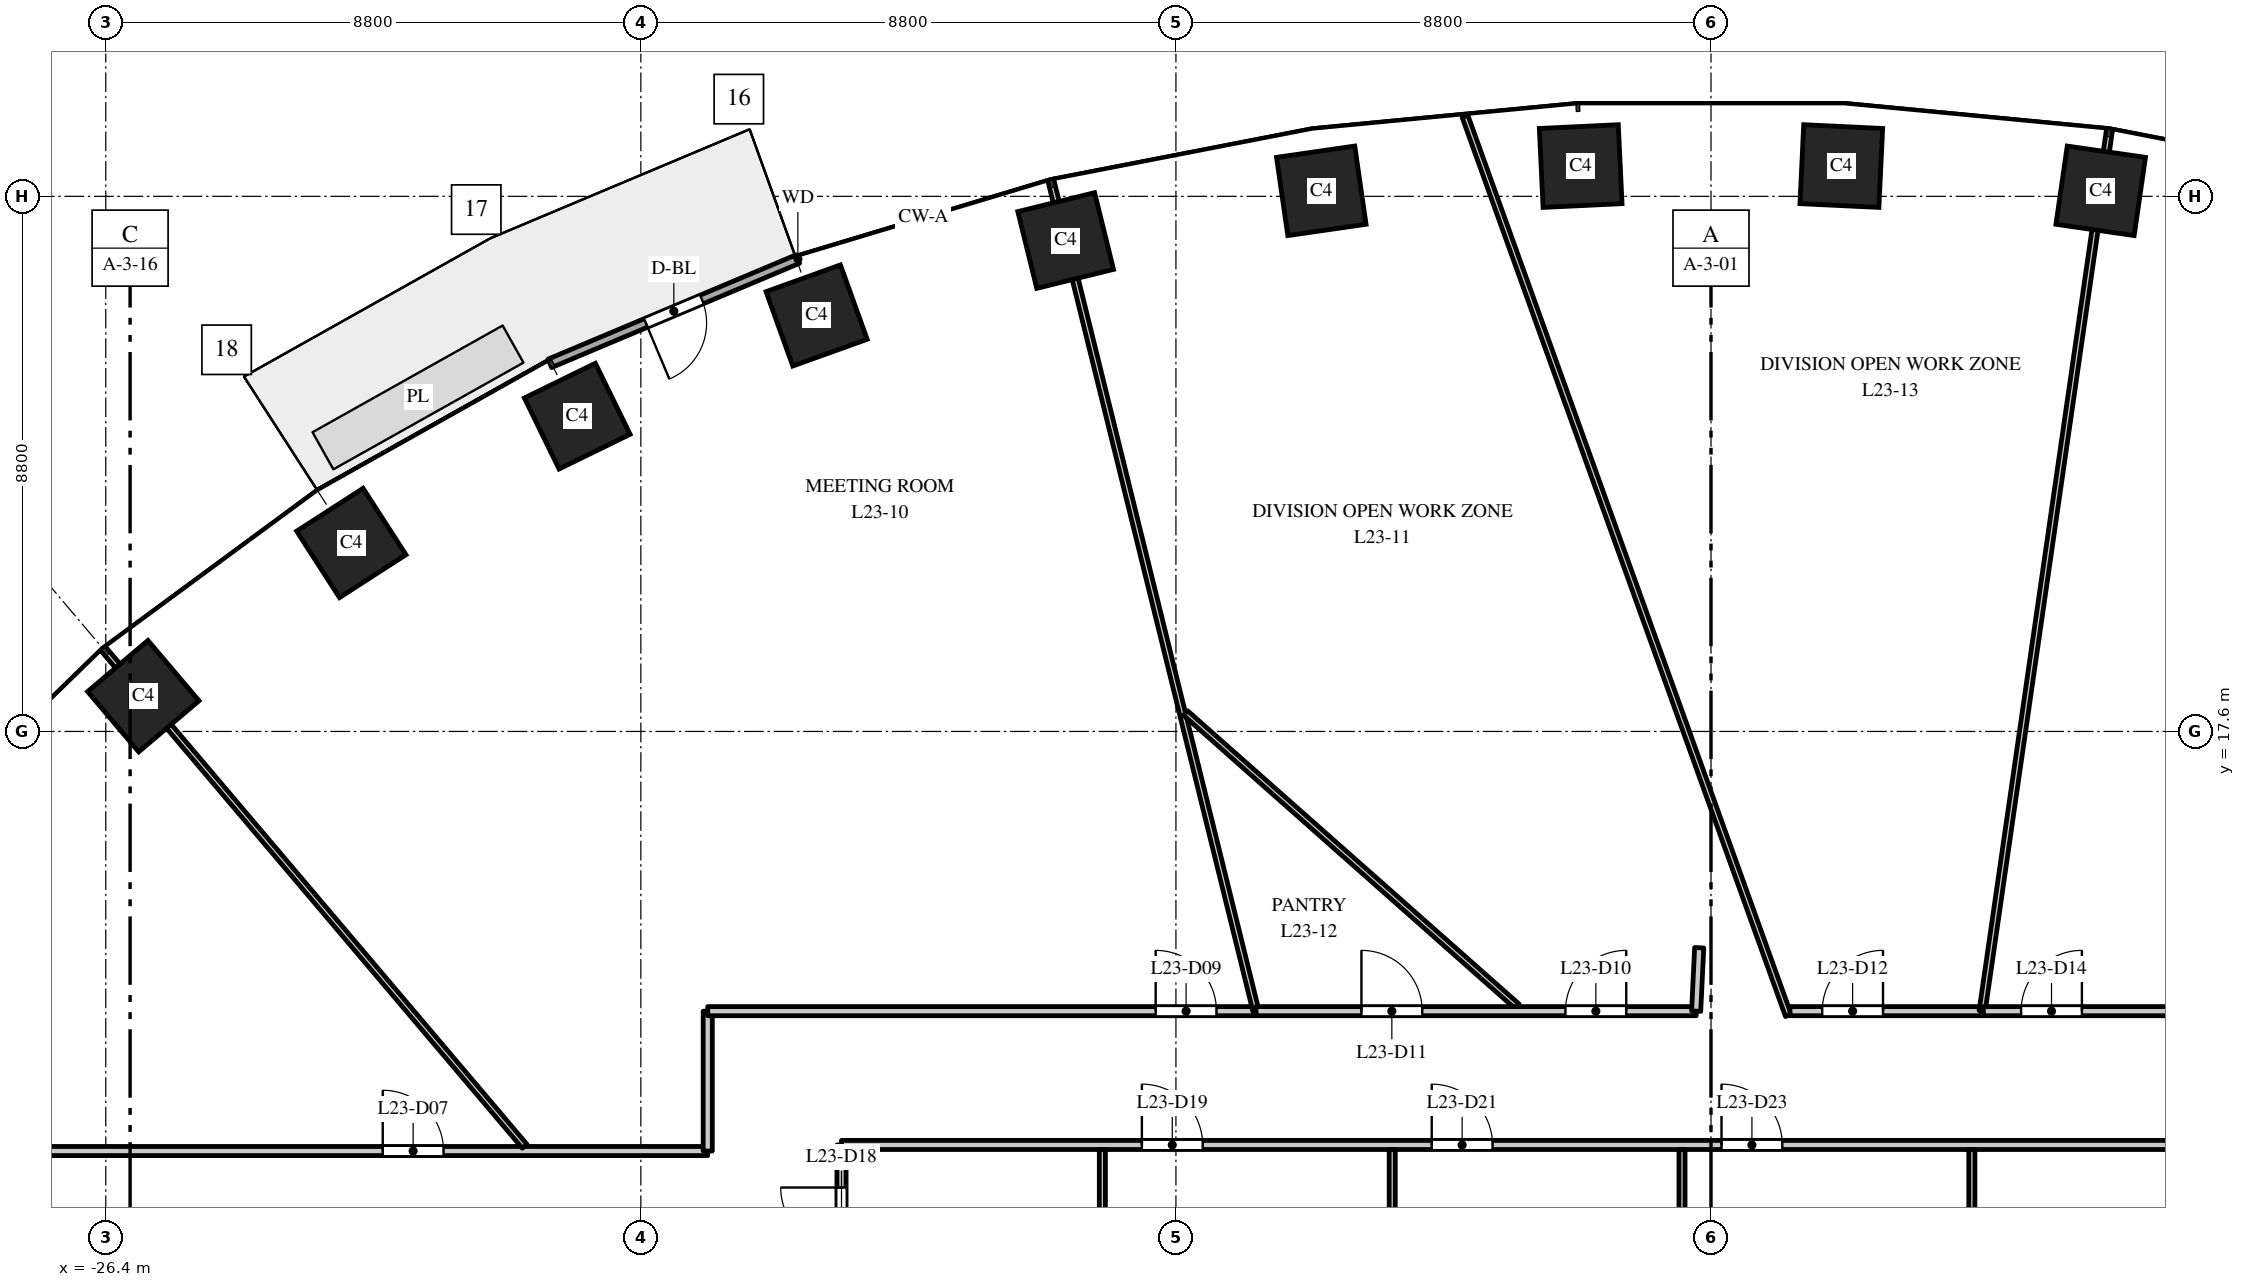
"""IFC4 building model, lengths in metres.
Left out: names, types, materials, properties, quantities, classifications, styles, units other than length and angle.
Written with IfcOpenShell. Run it as: python <this file> out.ifc"""

import sys

from ifc_helpers import new_model, si_unit, direction, frame, frame_2d, origin, origin_2d, place, context, subcontext, project, spatial, rectangle, extrude, element, fill, save


model = new_model("IFC4")
c1 = context("Model", 3, precision=1e-05, world=origin(), true_north=direction((0.0, 1.0)))
c2 = subcontext(c1, "Body", "Model", "MODEL_VIEW")
j1 = project(units=[si_unit("LENGTHUNIT", "METRE"), si_unit("PLANEANGLEUNIT", "RADIAN")], contexts=[c1])
p1 = place(None, origin())
s1 = spatial("IfcSite", under=j1, at=p1, CompositionType="ELEMENT")
p2 = place(p1, origin())
s2 = spatial("IfcBuilding", under=s1, at=p2, CompositionType="ELEMENT")
p3 = place(p2, frame((0.0, 0.0, 104.0)))
s3 = spatial("IfcBuildingStorey", under=s2, at=p3, CompositionType="ELEMENT", Elevation=104.0)
for number, where, z_axis, x_axis in (
    (1, (6.409, 26.491, 0.0), (0.0, 0.0, 1.0), (-0.99, 0.143, 0.0)),
    (2, (2.143, 26.898, 0.0), (0.0, 0.0, 1.0), (-0.999, 0.048, 0.0)),
    (3, (-2.143, 26.898, 0.0), (0.0, 0.0, 1.0), (-0.999, -0.048, 0.0)),
    (4, (-6.409, 26.491, 0.0), (0.0, 0.0, 1.0), (-0.99, -0.143, 0.0)),
    (5, (-10.613, 25.674, 0.0), (0.0, 0.0, 1.0), (-0.971, -0.24, 0.0)),
    (6, (-14.709, 24.441, 0.0), (0.0, 0.0, 1.0), (-0.941, -0.338, 0.0)),
    (7, (-18.646, 22.785, 0.0), (0.0, 0.0, 1.0), (-0.898, -0.439, 0.0)),
    (8, (-22.362, 20.7, 0.0), (0.0, 0.0, 1.0), (-0.84, -0.542, 0.0)),
    (9, (-25.783, 18.18, 0.0), (0.0, 0.0, 1.0), (-0.763, -0.646, 0.0)),
):
    element("IfcColumn", number, at=place(p3, frame(where, z_axis=z_axis, x_axis=x_axis)), inside=s3, PredefinedType="COLUMN", context=c2, shape_type="SweptSolid", body=[
        extrude(rectangle(XDim=1.3, YDim=1.3, at=origin_2d()), origin(), (0.0, 0.0, 1.0), 4.0),
    ])
p4 = place(p3, frame((-15.018, 25.369, 0.0), z_axis=(0.0, 0.0, 1.0), x_axis=(-0.921816985161, -0.387625393736, 0.0)))
e10 = element("IfcWall", 10, at=p4, inside=s3, PredefinedType="STANDARD", context=c2, shape_type="SweptSolid", body=[
    extrude(rectangle(XDim=4.426, YDim=0.15, at=frame_2d((2.213, 0.0))), origin(), (0.0, 0.0, 1.0), 3.7),
])
p5 = place(p4, frame((1.713, 0.0, 0.0)))
e11 = element("IfcOpeningElement", 11, at=p5, cuts=e10, PredefinedType="OPENING", context=c2, shape_type="SweptSolid", body=[
    extrude(rectangle(XDim=1.0, YDim=2.4, at=frame_2d((0.5, 1.2))), frame((0.0, 0.085, 0.0), z_axis=(0.0, -1.0, 0.0), x_axis=(1.0, 0.0, 0.0)), (0.0, 0.0, 1.0), 0.17),
])
p6 = place(p3, frame((-31.5, 10.7, 0.0), z_axis=(0.0, 0.0, 1.0), x_axis=(1.0, 0.0, 0.0)))
e12 = element("IfcWall", 12, at=p6, inside=s3, PredefinedType="PARTITIONING", context=c2, shape_type="SweptSolid", body=[
    extrude(rectangle(XDim=15.0, YDim=0.15, at=frame_2d((7.5, 0.0))), origin(), (0.0, 0.0, 1.0), 3.1),
])
p7 = place(p6, frame((9.655, 0.0, 0.0)))
e13 = element("IfcOpeningElement", 13, at=p7, cuts=e12, PredefinedType="OPENING", context=c2, shape_type="SweptSolid", body=[
    extrude(rectangle(XDim=1.0, YDim=2.1, at=frame_2d((0.5, 1.05))), frame((0.0, 0.085, 0.0), z_axis=(0.0, -1.0, 0.0), x_axis=(1.0, 0.0, 0.0)), (0.0, 0.0, 1.0), 0.17),
])
p8 = place(p3, frame((-26.43, 18.945, 0.0), z_axis=(0.0, 0.0, 1.0), x_axis=(0.646400187952, -0.762998556365, 0.0)))
e14 = element("IfcWall", 14, at=p8, inside=s3, PredefinedType="PARTITIONING", context=c2, shape_type="SweptSolid", body=[
    extrude(rectangle(XDim=10.704, YDim=0.1, at=frame_2d((5.352, 0.0))), origin(), (0.0, 0.0, 1.0), 3.7),
])
p9 = place(p3, frame((-16.5, 10.7, 0.0), z_axis=(0.0, 0.0, 1.0), x_axis=(0.0, 1.0, 0.0)))
e15 = element("IfcWall", 15, at=p9, inside=s3, PredefinedType="PARTITIONING", context=c2, shape_type="SweptSolid", body=[
    extrude(rectangle(XDim=2.3, YDim=0.15, at=frame_2d((1.15, 0.0))), origin(), (0.0, 0.0, 1.0), 2.75),
])
p10 = place(p3, frame((-16.5, 13.0, 0.0), z_axis=(0.0, 0.0, 1.0), x_axis=(1.0, 0.0, 0.0)))
e16 = element("IfcWall", 16, at=p10, inside=s3, PredefinedType="PARTITIONING", context=c2, shape_type="SweptSolid", body=[
    extrude(rectangle(XDim=9.001, YDim=0.15, at=frame_2d((4.5, 0.0))), origin(), (0.0, 0.0, 1.0), 2.85),
])
p11 = place(p10, frame((7.367, 0.0, 0.0)))
e17 = element("IfcOpeningElement", 17, at=p11, cuts=e16, PredefinedType="OPENING", context=c2, shape_type="SweptSolid", body=[
    extrude(rectangle(XDim=1.0, YDim=2.1, at=frame_2d((0.5, 1.05))), frame((0.0, 0.085, 0.0), z_axis=(0.0, -1.0, 0.0), x_axis=(1.0, 0.0, 0.0)), (0.0, 0.0, 1.0), 0.17),
])
p12 = place(p3, frame((-14.3, -10.8, 0.0), z_axis=(0.0, 0.0, 1.0), x_axis=(0.0, 1.0, 0.0)))
e18 = element("IfcWall", 18, at=p12, inside=s3, PredefinedType="PARTITIONING", context=c2, shape_type="SweptSolid", body=[
    extrude(rectangle(XDim=21.6, YDim=0.15, at=frame_2d((10.8, 0.0))), origin(), (0.0, 0.0, 1.0), 2.75),
])
p13 = place(p12, frame((19.9, 0.0, 0.0)))
e19 = element("IfcOpeningElement", 19, at=p13, cuts=e18, PredefinedType="OPENING", context=c2, shape_type="SweptSolid", body=[
    extrude(rectangle(XDim=1.0, YDim=2.1, at=frame_2d((0.5, 1.05))), frame((0.0, 0.085, 0.0), z_axis=(0.0, -1.0, 0.0), x_axis=(1.0, 0.0, 0.0)), (0.0, 0.0, 1.0), 0.17),
])
p14 = place(p3, frame((-14.3, 10.8, 0.0), z_axis=(0.0, 0.0, 1.0), x_axis=(1.0, 0.0, 0.0)))
e20 = element("IfcWall", 20, at=p14, inside=s3, PredefinedType="PARTITIONING", context=c2, shape_type="SweptSolid", body=[
    extrude(rectangle(XDim=28.6, YDim=0.15, at=frame_2d((14.3, 0.0))), origin(), (0.0, 0.0, 1.0), 2.85),
])
p15 = place(p14, frame((4.94, 0.0, 0.0)))
e21 = element("IfcOpeningElement", 21, at=p15, cuts=e20, PredefinedType="OPENING", context=c2, shape_type="SweptSolid", body=[
    extrude(rectangle(XDim=1.0, YDim=2.1, at=frame_2d((0.5, 1.05))), frame((0.0, 0.085, 0.0), z_axis=(0.0, -1.0, 0.0), x_axis=(1.0, 0.0, 0.0)), (0.0, 0.0, 1.0), 0.17),
])
p16 = place(p14, frame((9.707, 0.0, 0.0)))
e22 = element("IfcOpeningElement", 22, at=p16, cuts=e20, PredefinedType="OPENING", context=c2, shape_type="SweptSolid", body=[
    extrude(rectangle(XDim=1.0, YDim=2.1, at=frame_2d((0.5, 1.05))), frame((0.0, 0.085, 0.0), z_axis=(0.0, -1.0, 0.0), x_axis=(1.0, 0.0, 0.0)), (0.0, 0.0, 1.0), 0.17),
])
p17 = place(p14, frame((14.473, 0.0, 0.0)))
e23 = element("IfcOpeningElement", 23, at=p17, cuts=e20, PredefinedType="OPENING", context=c2, shape_type="SweptSolid", body=[
    extrude(rectangle(XDim=1.0, YDim=2.1, at=frame_2d((0.5, 1.05))), frame((0.0, 0.085, 0.0), z_axis=(0.0, -1.0, 0.0), x_axis=(1.0, 0.0, 0.0)), (0.0, 0.0, 1.0), 0.17),
])
p18 = place(p3, frame((-10.853, 26.646, 0.0), z_axis=(0.0, 0.0, 1.0), x_axis=(0.239763745499, -0.97083126564, 0.0)))
e24 = element("IfcWall", 24, at=p18, inside=s3, PredefinedType="PARTITIONING", context=c2, shape_type="SweptSolid", body=[
    extrude(rectangle(XDim=14.056, YDim=0.1, at=frame_2d((7.028, 0.0))), origin(), (0.0, 0.0, 1.0), 2.85),
])
p19 = place(p3, frame((-10.01, -10.725, 0.0), z_axis=(0.0, 0.0, 1.0), x_axis=(0.0, 1.0, 0.0)))
e25 = element("IfcWall", 25, at=p19, inside=s3, PredefinedType="PARTITIONING", context=c2, shape_type="SweptSolid", body=[
    extrude(rectangle(XDim=21.45, YDim=0.1, at=frame_2d((10.725, 0.0))), origin(), (0.0, 0.0, 1.0), 2.75),
])
p20 = place(p3, frame((-8.642, 17.903, 0.0), z_axis=(0.0, 0.0, 1.0), x_axis=(0.749027274438, -0.662539162728, 0.0)))
e26 = element("IfcWall", 26, at=p20, inside=s3, PredefinedType="PARTITIONING", context=c2, shape_type="SweptSolid", body=[
    extrude(rectangle(XDim=7.283, YDim=0.1, at=frame_2d((3.642, 0.0))), origin(), (0.0, 0.0, 1.0), 2.85),
])
p21 = place(p3, frame((-7.483, 13.0, 0.0), z_axis=(0.0, 0.0, 1.0), x_axis=(1.0, 0.0, 0.0)))
e27 = element("IfcWall", 27, at=p21, inside=s3, PredefinedType="PARTITIONING", context=c2, shape_type="SweptSolid", body=[
    extrude(rectangle(XDim=7.239, YDim=0.15, at=frame_2d((3.62, 0.0))), origin(), (0.0, 0.0, 1.0), 2.85),
])
p22 = place(p21, frame((5.089, 0.0, 0.0)))
e28 = element("IfcOpeningElement", 28, at=p22, cuts=e27, PredefinedType="OPENING", context=c2, shape_type="SweptSolid", body=[
    extrude(rectangle(XDim=1.0, YDim=2.1, at=frame_2d((0.5, 1.05))), frame((0.0, 0.085, 0.0), z_axis=(0.0, -1.0, 0.0), x_axis=(1.0, 0.0, 0.0)), (0.0, 0.0, 1.0), 0.17),
])
p23 = place(p21, frame((1.734, 0.0, 0.0)))
e29 = element("IfcOpeningElement", 29, at=p23, cuts=e27, PredefinedType="OPENING", context=c2, shape_type="SweptSolid", body=[
    extrude(rectangle(XDim=1.0, YDim=2.1, at=frame_2d((0.5, 1.05))), frame((0.0, 0.085, 0.0), z_axis=(0.0, -1.0, 0.0), x_axis=(1.0, 0.0, 0.0)), (0.0, 0.0, 1.0), 0.17),
])
p24 = place(p3, frame((-5.243, 6.059, 0.0), z_axis=(0.0, 0.0, 1.0), x_axis=(0.0, 1.0, 0.0)))
e30 = element("IfcWall", 30, at=p24, inside=s3, PredefinedType="PARTITIONING", context=c2, shape_type="SweptSolid", body=[
    extrude(rectangle(XDim=4.666, YDim=0.1, at=frame_2d((2.333, 0.0))), origin(), (0.0, 0.0, 1.0), 2.9),
])
p25 = place(p3, frame((-4.046, 27.717, 0.0), z_axis=(0.0, 0.0, 1.0), x_axis=(0.338390477133, -0.941005783715, 0.0)))
e31 = element("IfcWall", 31, at=p25, inside=s3, PredefinedType="PARTITIONING", context=c2, shape_type="SweptSolid", body=[
    extrude(rectangle(XDim=15.715, YDim=0.1, at=frame_2d((7.857, 0.0))), origin(), (0.0, 0.0, 1.0), 2.85),
])
p26 = place(p3, frame((-0.477, 7.468, 0.0), z_axis=(0.0, 0.0, 1.0), x_axis=(0.0, 1.0, 0.0)))
e32 = element("IfcWall", 32, at=p26, inside=s3, PredefinedType="PARTITIONING", context=c2, shape_type="SweptSolid", body=[
    extrude(rectangle(XDim=3.257, YDim=0.1, at=frame_2d((1.628, 0.0))), origin(), (0.0, 0.0, 1.0), 2.9),
])
p27 = place(p3, frame((-0.244, 13.0, 0.0), z_axis=(0.0, 0.0, 1.0), x_axis=(0.047698455829, 0.998861780884, 0.0)))
e33 = element("IfcWall", 33, at=p27, inside=s3, PredefinedType="PARTITIONING", context=c2, shape_type="SweptSolid", body=[
    extrude(rectangle(XDim=1.044, YDim=0.15, at=frame_2d((0.522, 0.0))), origin(), (0.0, 0.0, 1.0), 3.7),
])
p28 = place(p3, frame((1.299, 13.0, 0.0), z_axis=(0.0, 0.0, 1.0), x_axis=(1.0, 0.0, 0.0)))
e34 = element("IfcWall", 34, at=p28, inside=s3, PredefinedType="PARTITIONING", context=c2, shape_type="SweptSolid", body=[
    extrude(rectangle(XDim=3.16, YDim=0.15, at=frame_2d((1.58, 0.0))), origin(), (0.0, 0.0, 1.0), 2.85),
])
p29 = place(p28, frame((0.53, 0.0, 0.0)))
e35 = element("IfcOpeningElement", 35, at=p29, cuts=e34, PredefinedType="OPENING", context=c2, shape_type="SweptSolid", body=[
    extrude(rectangle(XDim=1.0, YDim=2.1, at=frame_2d((0.5, 1.05))), frame((0.0, 0.085, 0.0), z_axis=(0.0, -1.0, 0.0), x_axis=(1.0, 0.0, 0.0)), (0.0, 0.0, 1.0), 0.17),
])
p30 = place(p3, frame((4.29, 6.568, 0.0), z_axis=(0.0, 0.0, 1.0), x_axis=(0.0, 1.0, 0.0)))
e36 = element("IfcWall", 36, at=p30, inside=s3, PredefinedType="PARTITIONING", context=c2, shape_type="SweptSolid", body=[
    extrude(rectangle(XDim=4.157, YDim=0.1, at=frame_2d((2.079, 0.0))), origin(), (0.0, 0.0, 1.0), 2.9),
])
p31 = place(p3, frame((4.459, 13.004, 0.0), z_axis=(0.0, 0.0, 1.0), x_axis=(0.143087196312, 0.98971008596, 0.0)))
e37 = element("IfcWall", 37, at=p31, inside=s3, PredefinedType="PARTITIONING", context=c2, shape_type="SweptSolid", body=[
    extrude(rectangle(XDim=14.628, YDim=0.1, at=frame_2d((7.314, 0.0))), origin(), (0.0, 0.0, 1.0), 2.85),
])
p32 = place(p3, frame((4.479, 13.0, 0.0), z_axis=(0.0, 0.0, 1.0), x_axis=(1.0, 0.0, 0.0)))
e38 = element("IfcWall", 38, at=p32, inside=s3, PredefinedType="PARTITIONING", context=c2, shape_type="SweptSolid", body=[
    extrude(rectangle(XDim=12.021, YDim=0.15, at=frame_2d((6.01, 0.0))), origin(), (0.0, 0.0, 1.0), 2.85),
])
p33 = place(p32, frame((0.621, 0.0, 0.0)))
e39 = element("IfcOpeningElement", 39, at=p33, cuts=e38, PredefinedType="OPENING", context=c2, shape_type="SweptSolid", body=[
    extrude(rectangle(XDim=1.0, YDim=2.1, at=frame_2d((0.5, 1.05))), frame((0.0, 0.085, 0.0), z_axis=(0.0, -1.0, 0.0), x_axis=(1.0, 0.0, 0.0)), (0.0, 0.0, 1.0), 0.17),
])
p34 = place(p5, origin())
e40 = element("IfcDoor", 40, at=p34, inside=s3, OperationType="SINGLE_SWING_RIGHT", PredefinedType="DOOR", context=c2, shape_type="SweptSolid", body=[
    extrude(rectangle(XDim=1.0, YDim=2.4, at=frame_2d((0.5, 1.2))), frame((0.0, 0.025, 0.0), z_axis=(0.0, -1.0, 0.0), x_axis=(1.0, 0.0, 0.0)), (0.0, 0.0, 1.0), 0.05),
])
fill(e11, e40)
p35 = place(p7, origin())
e41 = element("IfcDoor", 41, at=p35, inside=s3, OperationType="SINGLE_SWING_LEFT", PredefinedType="DOOR", context=c2, shape_type="SweptSolid", body=[
    extrude(rectangle(XDim=1.0, YDim=2.1, at=frame_2d((0.5, 1.05))), frame((0.0, 0.025, 0.0), z_axis=(0.0, -1.0, 0.0), x_axis=(1.0, 0.0, 0.0)), (0.0, 0.0, 1.0), 0.05),
])
fill(e13, e41)
p36 = place(p11, origin())
e42 = element("IfcDoor", 42, at=p36, inside=s3, OperationType="SINGLE_SWING_LEFT", PredefinedType="DOOR", context=c2, shape_type="SweptSolid", body=[
    extrude(rectangle(XDim=1.0, YDim=2.1, at=frame_2d((0.5, 1.05))), frame((0.0, 0.025, 0.0), z_axis=(0.0, -1.0, 0.0), x_axis=(1.0, 0.0, 0.0)), (0.0, 0.0, 1.0), 0.05),
])
fill(e17, e42)
p37 = place(p22, origin())
e43 = element("IfcDoor", 43, at=p37, inside=s3, OperationType="SINGLE_SWING_RIGHT", PredefinedType="DOOR", context=c2, shape_type="SweptSolid", body=[
    extrude(rectangle(XDim=1.0, YDim=2.1, at=frame_2d((0.5, 1.05))), frame((0.0, 0.025, 0.0), z_axis=(0.0, -1.0, 0.0), x_axis=(1.0, 0.0, 0.0)), (0.0, 0.0, 1.0), 0.05),
])
fill(e28, e43)
p38 = place(p23, origin())
e44 = element("IfcDoor", 44, at=p38, inside=s3, OperationType="SINGLE_SWING_LEFT", PredefinedType="DOOR", context=c2, shape_type="SweptSolid", body=[
    extrude(rectangle(XDim=1.0, YDim=2.1, at=frame_2d((0.5, 1.05))), frame((0.0, 0.025, 0.0), z_axis=(0.0, -1.0, 0.0), x_axis=(1.0, 0.0, 0.0)), (0.0, 0.0, 1.0), 0.05),
])
fill(e29, e44)
p39 = place(p29, origin())
e45 = element("IfcDoor", 45, at=p39, inside=s3, OperationType="SINGLE_SWING_RIGHT", PredefinedType="DOOR", context=c2, shape_type="SweptSolid", body=[
    extrude(rectangle(XDim=1.0, YDim=2.1, at=frame_2d((0.5, 1.05))), frame((0.0, 0.025, 0.0), z_axis=(0.0, -1.0, 0.0), x_axis=(1.0, 0.0, 0.0)), (0.0, 0.0, 1.0), 0.05),
])
fill(e35, e45)
p40 = place(p33, origin())
e46 = element("IfcDoor", 46, at=p40, inside=s3, OperationType="SINGLE_SWING_RIGHT", PredefinedType="DOOR", context=c2, shape_type="SweptSolid", body=[
    extrude(rectangle(XDim=1.0, YDim=2.1, at=frame_2d((0.5, 1.05))), frame((0.0, 0.025, 0.0), z_axis=(0.0, -1.0, 0.0), x_axis=(1.0, 0.0, 0.0)), (0.0, 0.0, 1.0), 0.05),
])
fill(e39, e46)
p41 = place(p13, origin())
e47 = element("IfcDoor", 47, at=p41, inside=s3, OperationType="SINGLE_SWING_RIGHT", PredefinedType="DOOR", context=c2, shape_type="SweptSolid", body=[
    extrude(rectangle(XDim=1.0, YDim=2.1, at=frame_2d((0.5, 1.05))), frame((0.0, 0.025, 0.0), z_axis=(0.0, -1.0, 0.0), x_axis=(1.0, 0.0, 0.0)), (0.0, 0.0, 1.0), 0.05),
])
fill(e19, e47)
p42 = place(p15, origin())
e48 = element("IfcDoor", 48, at=p42, inside=s3, OperationType="SINGLE_SWING_LEFT", PredefinedType="DOOR", context=c2, shape_type="SweptSolid", body=[
    extrude(rectangle(XDim=1.0, YDim=2.1, at=frame_2d((0.5, 1.05))), frame((0.0, 0.025, 0.0), z_axis=(0.0, -1.0, 0.0), x_axis=(1.0, 0.0, 0.0)), (0.0, 0.0, 1.0), 0.05),
])
fill(e21, e48)
p43 = place(p16, origin())
e49 = element("IfcDoor", 49, at=p43, inside=s3, OperationType="SINGLE_SWING_LEFT", PredefinedType="DOOR", context=c2, shape_type="SweptSolid", body=[
    extrude(rectangle(XDim=1.0, YDim=2.1, at=frame_2d((0.5, 1.05))), frame((0.0, 0.025, 0.0), z_axis=(0.0, -1.0, 0.0), x_axis=(1.0, 0.0, 0.0)), (0.0, 0.0, 1.0), 0.05),
])
fill(e22, e49)
p44 = place(p17, origin())
e50 = element("IfcDoor", 50, at=p44, inside=s3, OperationType="SINGLE_SWING_LEFT", PredefinedType="DOOR", context=c2, shape_type="SweptSolid", body=[
    extrude(rectangle(XDim=1.0, YDim=2.1, at=frame_2d((0.5, 1.05))), frame((0.0, 0.025, 0.0), z_axis=(0.0, -1.0, 0.0), x_axis=(1.0, 0.0, 0.0)), (0.0, 0.0, 1.0), 0.05),
])
fill(e23, e50)
save(model, sys.argv[1])
